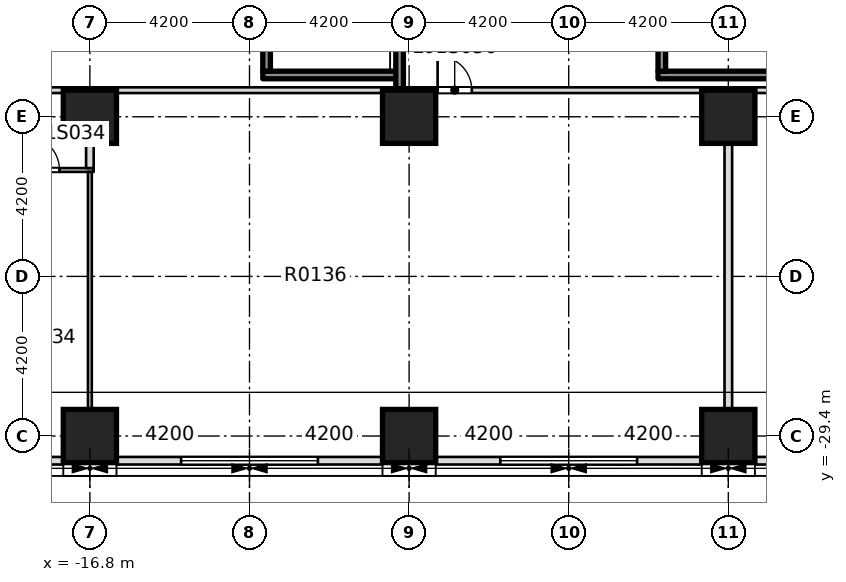
"""IFC4 building model, lengths in metres.
Left out: names, types, materials, properties, quantities, classifications, styles, units other than length and angle.
Written with IfcOpenShell. Run it as: python <this file> out.ifc"""

import sys

from ifc_helpers import new_model, si_unit, direction, frame, frame_2d, origin, origin_2d, place, context, subcontext, project, spatial, rectangle, extrude, element, fill, save


model = new_model("IFC4")
c1 = context("Model", 3, precision=1e-05, world=origin(), true_north=direction((0.0, 1.0)))
c2 = subcontext(c1, "Body", "Model", "MODEL_VIEW")
j1 = project(units=[si_unit("LENGTHUNIT", "METRE"), si_unit("PLANEANGLEUNIT", "RADIAN")], contexts=[c1])
p1 = place(None, origin())
s1 = spatial("IfcSite", under=j1, at=p1, CompositionType="ELEMENT")
p2 = place(p1, origin())
s2 = spatial("IfcBuilding", under=s1, at=p2, CompositionType="ELEMENT")
p3 = place(p2, frame((0.0, 0.0, 7.5)))
s3 = spatial("IfcBuildingStorey", under=s2, at=p3, CompositionType="ELEMENT", Elevation=7.5)
for number, where, z_axis, x_axis in (
    (1, (-16.8, -21.0, -0.4), (0.0, 0.0, 1.0), (1.0, 0.0, 0.0)),
    (2, (-8.4, -21.0, -0.4), (0.0, 0.0, 1.0), (1.0, 0.0, 0.0)),
    (3, (0.0, -21.0, -0.4), (0.0, 0.0, 1.0), (1.0, 0.0, 0.0)),
    (4, (-16.8, -29.4, 0.0), (0.0, 0.0, 1.0), (1.0, 0.0, 0.0)),
    (5, (-8.4, -29.4, 0.0), (0.0, 0.0, 1.0), (1.0, 0.0, 0.0)),
    (6, (0.0, -29.4, 0.0), (0.0, 0.0, 1.0), (1.0, 0.0, 0.0)),
):
    element("IfcColumn", number, at=place(p3, frame(where, z_axis=z_axis, x_axis=x_axis)), inside=s3, PredefinedType="COLUMN", context=c2, shape_type="SweptSolid", body=[
        extrude(rectangle(XDim=1.4, YDim=1.4, at=origin_2d()), origin(), (0.0, 0.0, 1.0), 5.0),
    ])
p4 = place(p3, frame((-25.3, -22.4, 0.0), z_axis=(0.0, 0.0, 1.0), x_axis=(1.0, 0.0, 0.0)))
e7 = element("IfcWall", 7, at=p4, inside=s3, PredefinedType="PARTITIONING", context=c2, shape_type="SweptSolid", body=[
    extrude(rectangle(XDim=8.6, YDim=0.1, at=frame_2d((4.3, 0.0))), origin(), (0.0, 0.0, 1.0), 4.6),
])
p5 = place(p4, frame((1.15, 0.0, 0.0)))
e8 = element("IfcOpeningElement", 8, at=p5, cuts=e7, PredefinedType="OPENING", context=c2, shape_type="SweptSolid", body=[
    extrude(rectangle(XDim=0.9, YDim=2.1, at=frame_2d((0.45, 1.05))), frame((0.0, 0.06, 0.0), z_axis=(0.0, -1.0, 0.0), x_axis=(1.0, 0.0, 0.0)), (0.0, 0.0, 1.0), 0.12),
])
p6 = place(p4, frame((4.15, 0.0, 0.0)))
e9 = element("IfcOpeningElement", 9, at=p6, cuts=e7, PredefinedType="OPENING", context=c2, shape_type="SweptSolid", body=[
    extrude(rectangle(XDim=0.9, YDim=2.1, at=frame_2d((0.45, 1.05))), frame((0.0, 0.06, 0.0), z_axis=(0.0, -1.0, 0.0), x_axis=(1.0, 0.0, 0.0)), (0.0, 0.0, 1.0), 0.12),
])
p7 = place(p4, frame((6.8, 0.0, 0.0)))
e10 = element("IfcOpeningElement", 10, at=p7, cuts=e7, PredefinedType="OPENING", context=c2, shape_type="SweptSolid", body=[
    extrude(rectangle(XDim=0.9, YDim=2.1, at=frame_2d((0.45, 1.05))), frame((0.0, 0.06, 0.0), z_axis=(0.0, -1.0, 0.0), x_axis=(1.0, 0.0, 0.0)), (0.0, 0.0, 1.0), 0.12),
])
p8 = place(p3, frame((-34.15, -20.3, 0.0), z_axis=(0.0, 0.0, 1.0), x_axis=(1.0, 0.0, 0.0)))
e11 = element("IfcWall", 11, at=p8, inside=s3, PredefinedType="PARTITIONING", context=c2, shape_type="SweptSolid", body=[
    extrude(rectangle(XDim=67.825, YDim=0.15, at=frame_2d((33.913, 0.0))), origin(), (0.0, 0.0, 1.0), 4.6),
])
p9 = place(p8, frame((12.6, 0.0, 0.0)))
e12 = element("IfcOpeningElement", 12, at=p9, cuts=e11, PredefinedType="OPENING", context=c2, shape_type="SweptSolid", body=[
    extrude(rectangle(XDim=1.1, YDim=2.1, at=frame_2d((0.55, 1.05))), frame((0.0, 0.085, 0.0), z_axis=(0.0, -1.0, 0.0), x_axis=(1.0, 0.0, 0.0)), (0.0, 0.0, 1.0), 0.17),
])
p10 = place(p8, frame((4.025, 0.0, 0.0)))
e13 = element("IfcOpeningElement", 13, at=p10, cuts=e11, PredefinedType="OPENING", context=c2, shape_type="SweptSolid", body=[
    extrude(rectangle(XDim=0.9, YDim=2.1, at=frame_2d((0.45, 1.05))), frame((0.0, 0.085, 0.0), z_axis=(0.0, -1.0, 0.0), x_axis=(1.0, 0.0, 0.0)), (0.0, 0.0, 1.0), 0.17),
])
p11 = place(p8, frame((26.5, 0.0, 0.0)))
e14 = element("IfcOpeningElement", 14, at=p11, cuts=e11, PredefinedType="OPENING", context=c2, shape_type="SweptSolid", body=[
    extrude(rectangle(XDim=0.9, YDim=2.1, at=frame_2d((0.45, 1.05))), frame((0.0, 0.085, 0.0), z_axis=(0.0, -1.0, 0.0), x_axis=(1.0, 0.0, 0.0)), (0.0, 0.0, 1.0), 0.17),
])
p12 = place(p8, frame((40.85, 0.0, 0.0)))
e15 = element("IfcOpeningElement", 15, at=p12, cuts=e11, PredefinedType="OPENING", context=c2, shape_type="SweptSolid", body=[
    extrude(rectangle(XDim=0.9, YDim=2.1, at=frame_2d((0.45, 1.05))), frame((0.0, 0.085, 0.0), z_axis=(0.0, -1.0, 0.0), x_axis=(1.0, 0.0, 0.0)), (0.0, 0.0, 1.0), 0.17),
])
p13 = place(p8, frame((54.6, 0.0, 0.0)))
e16 = element("IfcOpeningElement", 16, at=p13, cuts=e11, PredefinedType="OPENING", context=c2, shape_type="SweptSolid", body=[
    extrude(rectangle(XDim=1.1, YDim=2.1, at=frame_2d((0.55, 1.05))), frame((0.0, 0.085, 0.0), z_axis=(0.0, -1.0, 0.0), x_axis=(1.0, 0.0, 0.0)), (0.0, 0.0, 1.0), 0.17),
])
p14 = place(p8, frame((63.1, 0.0, 0.0)))
e17 = element("IfcOpeningElement", 17, at=p14, cuts=e11, PredefinedType="OPENING", context=c2, shape_type="SweptSolid", body=[
    extrude(rectangle(XDim=0.9, YDim=2.1, at=frame_2d((0.45, 1.05))), frame((0.0, 0.085, 0.0), z_axis=(0.0, -1.0, 0.0), x_axis=(1.0, 0.0, 0.0)), (0.0, 0.0, 1.0), 0.17),
])
p15 = place(p3, frame((-16.8, -29.95, 0.0), z_axis=(0.0, 0.0, 1.0), x_axis=(0.0, 1.0, 0.0)))
e18 = element("IfcWall", 18, at=p15, inside=s3, PredefinedType="PARTITIONING", context=c2, shape_type="SweptSolid", body=[
    extrude(rectangle(XDim=7.5, YDim=0.1, at=frame_2d((3.75, 0.0))), origin(), (0.0, 0.0, 1.0), 4.6),
])
p16 = place(p3, frame((-16.8, -22.35, 0.0), z_axis=(0.0, 0.0, 1.0), x_axis=(0.0, 1.0, 0.0)))
e19 = element("IfcWall", 19, at=p16, inside=s3, PredefinedType="PARTITIONING", context=c2, shape_type="SweptSolid", body=[
    extrude(rectangle(XDim=1.975, YDim=0.2, at=frame_2d((0.988, 0.0))), origin(), (0.0, 0.0, 1.0), 4.6),
])
p17 = place(p3, frame((0.0, -29.95, 0.0), z_axis=(0.0, 0.0, 1.0), x_axis=(0.0, 1.0, 0.0)))
e20 = element("IfcWall", 20, at=p17, inside=s3, PredefinedType="PARTITIONING", context=c2, shape_type="SweptSolid", body=[
    extrude(rectangle(XDim=9.575, YDim=0.2, at=frame_2d((4.788, 0.0))), origin(), (0.0, 0.0, 1.0), 4.6),
])
p18 = place(p3, frame((-24.5, -30.05, 0.0), z_axis=(0.0, 0.0, 1.0), x_axis=(1.0, 0.0, 0.0)))
e21 = element("IfcWall", 21, at=p18, inside=s3, PredefinedType="STANDARD", context=c2, shape_type="SweptSolid", body=[
    extrude(rectangle(XDim=7.0, YDim=0.2, at=frame_2d((3.5, 0.0))), origin(), (0.0, 0.0, 1.0), 4.6),
])
p19 = place(p18, frame((1.7, 0.0, 0.9)))
e22 = element("IfcOpeningElement", 22, at=p19, cuts=e21, PredefinedType="OPENING", context=c2, shape_type="SweptSolid", body=[
    extrude(rectangle(XDim=3.6, YDim=2.8, at=frame_2d((1.8, 1.4))), frame((0.0, 0.11, 0.0), z_axis=(0.0, -1.0, 0.0), x_axis=(1.0, 0.0, 0.0)), (0.0, 0.0, 1.0), 0.22),
])
p20 = place(p3, frame((-16.1, -30.05, 0.0), z_axis=(0.0, 0.0, 1.0), x_axis=(1.0, 0.0, 0.0)))
e23 = element("IfcWall", 23, at=p20, inside=s3, PredefinedType="STANDARD", context=c2, shape_type="SweptSolid", body=[
    extrude(rectangle(XDim=7.0, YDim=0.2, at=frame_2d((3.5, 0.0))), origin(), (0.0, 0.0, 1.0), 4.6),
])
p21 = place(p20, frame((1.7, 0.0, 0.9)))
e24 = element("IfcOpeningElement", 24, at=p21, cuts=e23, PredefinedType="OPENING", context=c2, shape_type="SweptSolid", body=[
    extrude(rectangle(XDim=3.6, YDim=2.8, at=frame_2d((1.8, 1.4))), frame((0.0, 0.11, 0.0), z_axis=(0.0, -1.0, 0.0), x_axis=(1.0, 0.0, 0.0)), (0.0, 0.0, 1.0), 0.22),
])
p22 = place(p3, frame((-7.7, -30.05, 0.0), z_axis=(0.0, 0.0, 1.0), x_axis=(1.0, 0.0, 0.0)))
e25 = element("IfcWall", 25, at=p22, inside=s3, PredefinedType="STANDARD", context=c2, shape_type="SweptSolid", body=[
    extrude(rectangle(XDim=7.0, YDim=0.2, at=frame_2d((3.5, 0.0))), origin(), (0.0, 0.0, 1.0), 4.6),
])
p23 = place(p22, frame((1.7, 0.0, 0.9)))
e26 = element("IfcOpeningElement", 26, at=p23, cuts=e25, PredefinedType="OPENING", context=c2, shape_type="SweptSolid", body=[
    extrude(rectangle(XDim=3.6, YDim=2.8, at=frame_2d((1.8, 1.4))), frame((0.0, 0.11, 0.0), z_axis=(0.0, -1.0, 0.0), x_axis=(1.0, 0.0, 0.0)), (0.0, 0.0, 1.0), 0.22),
])
p24 = place(p3, frame((0.7, -30.05, 0.0), z_axis=(0.0, 0.0, 1.0), x_axis=(1.0, 0.0, 0.0)))
e27 = element("IfcWall", 27, at=p24, inside=s3, PredefinedType="STANDARD", context=c2, shape_type="SweptSolid", body=[
    extrude(rectangle(XDim=7.0, YDim=0.2, at=frame_2d((3.5, 0.0))), origin(), (0.0, 0.0, 1.0), 4.6),
])
p25 = place(p24, frame((1.7, 0.0, 0.9)))
e28 = element("IfcOpeningElement", 28, at=p25, cuts=e27, PredefinedType="OPENING", context=c2, shape_type="SweptSolid", body=[
    extrude(rectangle(XDim=3.6, YDim=2.8, at=frame_2d((1.8, 1.4))), frame((0.0, 0.11, 0.0), z_axis=(0.0, -1.0, 0.0), x_axis=(1.0, 0.0, 0.0)), (0.0, 0.0, 1.0), 0.22),
])
p26 = place(p3, frame((-12.25, -19.9, 0.0), z_axis=(0.0, 0.0, 1.0), x_axis=(1.0, 0.0, 0.0)))
e29 = element("IfcWall", 29, at=p26, inside=s3, PredefinedType="SOLIDWALL", context=c2, shape_type="SweptSolid", body=[
    extrude(rectangle(XDim=3.7, YDim=0.2, at=frame_2d((1.85, 0.0))), origin(), (0.0, 0.0, 1.0), 4.6),
])
p27 = place(p3, frame((-12.15, -19.8, 0.0), z_axis=(0.0, 0.0, 1.0), x_axis=(0.0, 1.0, 0.0)))
e30 = element("IfcWall", 30, at=p27, inside=s3, PredefinedType="SOLIDWALL", context=c2, shape_type="SweptSolid", body=[
    extrude(rectangle(XDim=6.6, YDim=0.2, at=frame_2d((3.3, 0.0))), origin(), (0.0, 0.0, 1.0), 4.6),
])
p28 = place(p3, frame((-8.65, -20.3, 0.0), z_axis=(0.0, 0.0, 1.0), x_axis=(0.0, 1.0, 0.0)))
e31 = element("IfcWall", 31, at=p28, inside=s3, PredefinedType="SOLIDWALL", context=c2, shape_type="SweptSolid", body=[
    extrude(rectangle(XDim=7.1, YDim=0.2, at=frame_2d((3.55, 0.0))), origin(), (0.0, 0.0, 1.0), 4.6),
])
p29 = place(p3, frame((-1.85, -19.9, 0.0), z_axis=(0.0, 0.0, 1.0), x_axis=(1.0, 0.0, 0.0)))
e32 = element("IfcWall", 32, at=p29, inside=s3, PredefinedType="SOLIDWALL", context=c2, shape_type="SweptSolid", body=[
    extrude(rectangle(XDim=3.7, YDim=0.2, at=frame_2d((1.85, 0.0))), origin(), (0.0, 0.0, 1.0), 4.6),
])
p30 = place(p3, frame((-1.75, -19.8, 0.0), z_axis=(0.0, 0.0, 1.0), x_axis=(0.0, 1.0, 0.0)))
e33 = element("IfcWall", 33, at=p30, inside=s3, PredefinedType="SOLIDWALL", context=c2, shape_type="SweptSolid", body=[
    extrude(rectangle(XDim=6.6, YDim=0.2, at=frame_2d((3.3, 0.0))), origin(), (0.0, 0.0, 1.0), 4.6),
])
p31 = place(p7, origin())
e34 = element("IfcDoor", 34, at=p31, inside=s3, OperationType="SINGLE_SWING_RIGHT", PredefinedType="DOOR", context=c2, shape_type="SweptSolid", body=[
    extrude(rectangle(XDim=0.9, YDim=2.1, at=frame_2d((0.45, 1.05))), frame((0.0, 0.025, 0.0), z_axis=(0.0, -1.0, 0.0), x_axis=(1.0, 0.0, 0.0)), (0.0, 0.0, 1.0), 0.05),
])
fill(e10, e34)
p32 = place(p11, origin())
e35 = element("IfcDoor", 35, at=p32, inside=s3, OperationType="SINGLE_SWING_LEFT", PredefinedType="DOOR", context=c2, shape_type="SweptSolid", body=[
    extrude(rectangle(XDim=0.9, YDim=2.1, at=frame_2d((0.45, 1.05))), frame((0.0, 0.025, 0.0), z_axis=(0.0, -1.0, 0.0), x_axis=(1.0, 0.0, 0.0)), (0.0, 0.0, 1.0), 0.05),
])
fill(e14, e35)
p33 = place(p21, origin())
e36 = element("IfcWindow", 36, at=p33, inside=s3, PartitioningType="SINGLE_PANEL", PredefinedType="WINDOW", context=c2, shape_type="SweptSolid", body=[
    extrude(rectangle(XDim=3.6, YDim=2.8, at=frame_2d((1.8, 1.4))), frame((0.0, 0.03, 0.0), z_axis=(0.0, -1.0, 0.0), x_axis=(1.0, 0.0, 0.0)), (0.0, 0.0, 1.0), 0.06),
])
fill(e24, e36)
p34 = place(p23, origin())
e37 = element("IfcWindow", 37, at=p34, inside=s3, PartitioningType="SINGLE_PANEL", PredefinedType="WINDOW", context=c2, shape_type="SweptSolid", body=[
    extrude(rectangle(XDim=3.6, YDim=2.8, at=frame_2d((1.8, 1.4))), frame((0.0, 0.03, 0.0), z_axis=(0.0, -1.0, 0.0), x_axis=(1.0, 0.0, 0.0)), (0.0, 0.0, 1.0), 0.06),
])
fill(e26, e37)
save(model, sys.argv[1])
